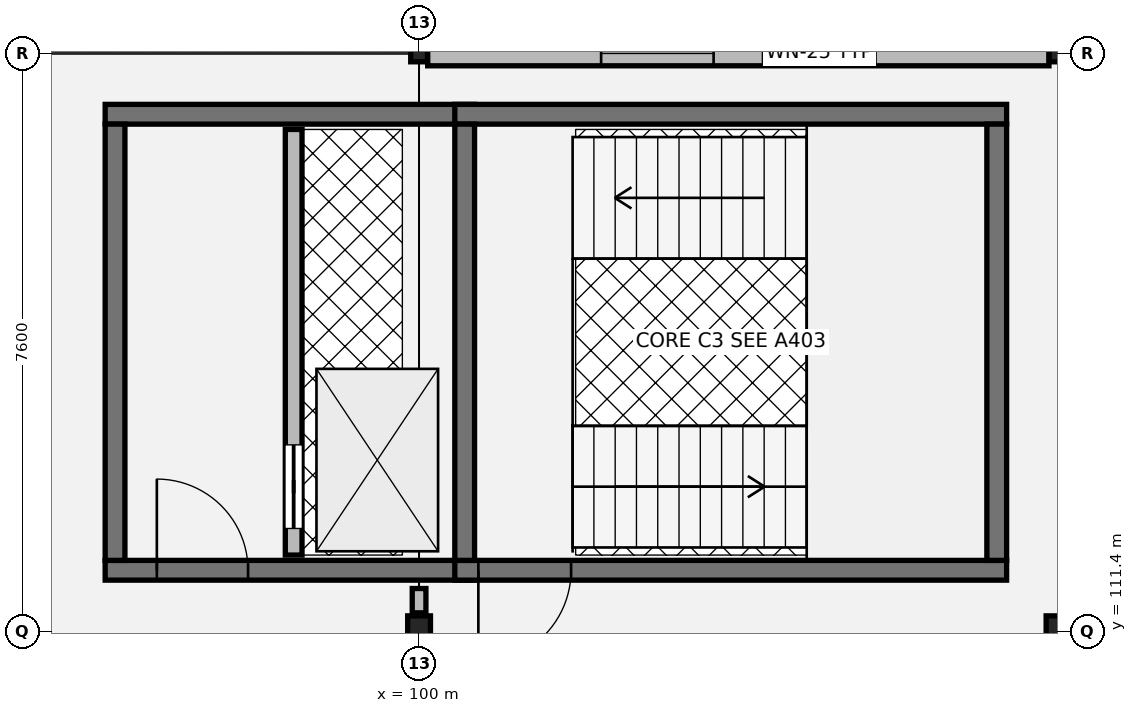
"""IFC4 building model, lengths in metres.
Left out: names, types, materials, properties, quantities, classifications, styles, units other than length and angle.
Written with IfcOpenShell. Run it as: python <this file> out.ifc"""

import sys

from ifc_helpers import new_model, si_unit, direction, frame, frame_2d, origin, origin_2d, place, context, subcontext, project, spatial, rectangle, hollow_rectangle, i_section, extrude, element, fill, save


model = new_model("IFC4")
c1 = context("Model", 3, precision=1e-05, world=origin(), true_north=direction((0.0, 1.0)))
c2 = subcontext(c1, "Body", "Model", "MODEL_VIEW")
j1 = project(units=[si_unit("LENGTHUNIT", "METRE"), si_unit("PLANEANGLEUNIT", "RADIAN")], contexts=[c1])
p1 = place(None, origin())
s1 = spatial("IfcSite", under=j1, at=p1, CompositionType="ELEMENT")
p2 = place(p1, origin())
s2 = spatial("IfcBuilding", under=s1, at=p2, CompositionType="ELEMENT")
p3 = place(p2, frame((0.0, 0.0, 13.26)))
s3 = spatial("IfcBuildingStorey", under=s2, at=p3, CompositionType="ELEMENT", Elevation=13.26)
p4 = place(p3, frame((100.0, 111.4, 0.0), z_axis=(0.0, 0.0, 1.0), x_axis=(1.0, 0.0, 0.0)))
e1 = element("IfcColumn", 1, at=p4, inside=s3, PredefinedType="COLUMN", context=c2, shape_type="SweptSolid", body=[
    extrude(i_section(OverallWidth=0.3, OverallDepth=0.4, WebThickness=0.013, FlangeThickness=0.024, at=origin_2d()), origin(), (0.0, 0.0, 1.0), 4.055),
])
p5 = place(p3, frame((100.0, 119.0, 0.0), z_axis=(0.0, 0.0, 1.0), x_axis=(1.0, 0.0, 0.0)))
e2 = element("IfcColumn", 2, at=p5, inside=s3, PredefinedType="COLUMN", context=c2, shape_type="SweptSolid", body=[
    extrude(hollow_rectangle(XDim=0.22, YDim=0.22, WallThickness=0.01, at=origin_2d()), origin(), (0.0, 0.0, 1.0), 4.055),
])
p6 = place(p3, frame((108.4, 111.4, 0.0), z_axis=(0.0, 0.0, 1.0), x_axis=(1.0, 0.0, 0.0)))
e3 = element("IfcColumn", 3, at=p6, inside=s3, PredefinedType="COLUMN", context=c2, shape_type="SweptSolid", body=[
    extrude(i_section(OverallWidth=0.3, OverallDepth=0.4, WebThickness=0.013, FlangeThickness=0.024, at=origin_2d()), origin(), (0.0, 0.0, 1.0), 4.055),
])
p7 = place(p3, frame((108.4, 119.0, 0.0), z_axis=(0.0, 0.0, 1.0), x_axis=(1.0, 0.0, 0.0)))
e4 = element("IfcColumn", 4, at=p7, inside=s3, PredefinedType="COLUMN", context=c2, shape_type="SweptSolid", body=[
    extrude(hollow_rectangle(XDim=0.22, YDim=0.22, WallThickness=0.01, at=origin_2d()), origin(), (0.0, 0.0, 1.0), 4.055),
])
p8 = place(p3, frame((108.287, 119.0, 0.0), z_axis=(0.0, 0.0, 1.0), x_axis=(-1.0, 0.0, 0.0)))
e5 = element("IfcWall", 5, at=p8, inside=s3, PredefinedType="SOLIDWALL", context=c2, shape_type="SweptSolid", body=[
    extrude(rectangle(XDim=8.174, YDim=0.325, at=frame_2d((4.087, 0.0))), origin(), (0.0, 0.0, 1.0), 3.48),
])
p9 = place(p8, frame((2.282, 0.0, 0.8)))
e6 = element("IfcOpeningElement", 6, at=p9, cuts=e5, PredefinedType="OPENING", context=c2, shape_type="SweptSolid", body=[
    extrude(rectangle(XDim=1.48, YDim=2.16, at=frame_2d((0.74, 1.08))), frame((0.0, 0.172, 0.0), z_axis=(0.0, -1.0, 0.0), x_axis=(1.0, 0.0, 0.0)), (0.0, 0.0, 1.0), 0.345),
])
p10 = place(p8, frame((4.412, 0.0, 0.8)))
e7 = element("IfcOpeningElement", 7, at=p10, cuts=e5, PredefinedType="OPENING", context=c2, shape_type="SweptSolid", body=[
    extrude(rectangle(XDim=1.48, YDim=2.16, at=frame_2d((0.74, 1.08))), frame((0.0, 0.172, 0.0), z_axis=(0.0, -1.0, 0.0), x_axis=(1.0, 0.0, 0.0)), (0.0, 0.0, 1.0), 0.345),
])
p11 = place(p3, frame((95.87, 112.2, 0.0), z_axis=(0.0, 0.0, 1.0), x_axis=(1.0, 0.0, 0.0)))
e8 = element("IfcWall", 8, at=p11, inside=s3, PredefinedType="SHEAR", context=c2, shape_type="SweptSolid", body=[
    extrude(rectangle(XDim=4.86, YDim=0.26, at=frame_2d((2.43, 0.0))), origin(), (0.0, 0.0, 1.0), 3.845),
])
p12 = place(p11, frame((0.68, 0.0, 0.0)))
e9 = element("IfcOpeningElement", 9, at=p12, cuts=e8, PredefinedType="OPENING", context=c2, shape_type="SweptSolid", body=[
    extrude(rectangle(XDim=1.2, YDim=2.16, at=frame_2d((0.6, 1.08))), frame((0.0, 0.14, 0.0), z_axis=(0.0, -1.0, 0.0), x_axis=(1.0, 0.0, 0.0)), (0.0, 0.0, 1.0), 0.28),
])
p13 = place(p3, frame((100.73, 118.2, 0.0), z_axis=(0.0, 0.0, 1.0), x_axis=(-1.0, 0.0, 0.0)))
e10 = element("IfcWall", 10, at=p13, inside=s3, PredefinedType="SHEAR", context=c2, shape_type="SweptSolid", body=[
    extrude(rectangle(XDim=4.86, YDim=0.26, at=frame_2d((2.43, 0.0))), origin(), (0.0, 0.0, 1.0), 3.845),
])
p14 = place(p3, frame((96.0, 118.07, 0.0), z_axis=(0.0, 0.0, 1.0), x_axis=(0.0, -1.0, 0.0)))
e11 = element("IfcWall", 11, at=p14, inside=s3, PredefinedType="SHEAR", context=c2, shape_type="SweptSolid", body=[
    extrude(rectangle(XDim=5.74, YDim=0.26, at=frame_2d((2.87, 0.0))), origin(), (0.0, 0.0, 1.0), 3.845),
])
p15 = place(p3, frame((98.35, 112.4, 0.0), z_axis=(0.0, 0.0, 1.0), x_axis=(0.0, 1.0, 0.0)))
e12 = element("IfcWall", 12, at=p15, inside=s3, PredefinedType="SOLIDWALL", context=c2, shape_type="SweptSolid", body=[
    extrude(rectangle(XDim=5.6, YDim=0.22, at=frame_2d((2.8, 0.0))), origin(), (0.0, 0.0, 1.0), 3.845),
])
p16 = place(p15, frame((0.35, 0.0, 0.0)))
e13 = element("IfcOpeningElement", 13, at=p16, cuts=e12, PredefinedType="OPENING", context=c2, shape_type="SweptSolid", body=[
    extrude(rectangle(XDim=1.1, YDim=2.15, at=frame_2d((0.55, 1.075))), frame((0.0, 0.12, 0.0), z_axis=(0.0, -1.0, 0.0), x_axis=(1.0, 0.0, 0.0)), (0.0, 0.0, 1.0), 0.24),
])
p17 = place(p3, frame((100.47, 112.2, 0.0), z_axis=(0.0, 0.0, 1.0), x_axis=(1.0, 0.0, 0.0)))
e14 = element("IfcWall", 14, at=p17, inside=s3, PredefinedType="SHEAR", context=c2, shape_type="SweptSolid", body=[
    extrude(rectangle(XDim=7.26, YDim=0.26, at=frame_2d((3.63, 0.0))), origin(), (0.0, 0.0, 1.0), 3.845),
])
p18 = place(p17, frame((0.31, 0.0, 0.0)))
e15 = element("IfcOpeningElement", 15, at=p18, cuts=e14, PredefinedType="OPENING", context=c2, shape_type="SweptSolid", body=[
    extrude(rectangle(XDim=1.22, YDim=2.18, at=frame_2d((0.61, 1.09))), frame((0.0, 0.14, 0.0), z_axis=(0.0, -1.0, 0.0), x_axis=(1.0, 0.0, 0.0)), (0.0, 0.0, 1.0), 0.28),
])
p19 = place(p3, frame((100.47, 118.2, 0.0), z_axis=(0.0, 0.0, 1.0), x_axis=(1.0, 0.0, 0.0)))
e16 = element("IfcWall", 16, at=p19, inside=s3, PredefinedType="SHEAR", context=c2, shape_type="SweptSolid", body=[
    extrude(rectangle(XDim=7.26, YDim=0.26, at=frame_2d((3.63, 0.0))), origin(), (0.0, 0.0, 1.0), 3.845),
])
for number, where, z_axis, x_axis in (
    (17, (100.6, 112.33, 0.0), (0.0, 0.0, 1.0), (0.0, 1.0, 0.0)),
    (18, (107.6, 112.33, 0.0), (0.0, 0.0, 1.0), (0.0, 1.0, 0.0)),
):
    element("IfcWall", number, at=place(p3, frame(where, z_axis=z_axis, x_axis=x_axis)), inside=s3, PredefinedType="SHEAR", context=c2, shape_type="SweptSolid", body=[
        extrude(rectangle(XDim=5.74, YDim=0.26, at=frame_2d((2.87, 0.0))), origin(), (0.0, 0.0, 1.0), 3.845),
    ])
p20 = place(p3, frame((100.0, 111.64, 0.0), z_axis=(0.0, 0.0, 1.0), x_axis=(0.0, 1.0, 0.0)))
e19 = element("IfcWall", 19, at=p20, inside=s3, PredefinedType="PARTITIONING", context=c2, shape_type="SweptSolid", body=[
    extrude(rectangle(XDim=0.32, YDim=0.18, at=frame_2d((0.16, 0.0))), origin(), (0.0, 0.0, 1.0), 3.18),
])
p21 = place(p9, origin())
e20 = element("IfcWindow", 20, at=p21, inside=s3, PartitioningType="SINGLE_PANEL", PredefinedType="WINDOW", context=c2, shape_type="SweptSolid", body=[
    extrude(rectangle(XDim=1.48, YDim=2.16, at=frame_2d((0.74, 1.08))), frame((0.0, 0.03, 0.0), z_axis=(0.0, -1.0, 0.0), x_axis=(1.0, 0.0, 0.0)), (0.0, 0.0, 1.0), 0.06),
])
fill(e6, e20)
p22 = place(p10, origin())
e21 = element("IfcWindow", 21, at=p22, inside=s3, PartitioningType="SINGLE_PANEL", PredefinedType="WINDOW", context=c2, shape_type="SweptSolid", body=[
    extrude(rectangle(XDim=1.48, YDim=2.16, at=frame_2d((0.74, 1.08))), frame((0.0, 0.03, 0.0), z_axis=(0.0, -1.0, 0.0), x_axis=(1.0, 0.0, 0.0)), (0.0, 0.0, 1.0), 0.06),
])
fill(e7, e21)
p23 = place(p12, origin())
e22 = element("IfcDoor", 22, at=p23, inside=s3, OperationType="SINGLE_SWING_LEFT", PredefinedType="DOOR", context=c2, shape_type="SweptSolid", body=[
    extrude(rectangle(XDim=1.2, YDim=2.16, at=frame_2d((0.6, 1.08))), frame((0.0, 0.025, 0.0), z_axis=(0.0, -1.0, 0.0), x_axis=(1.0, 0.0, 0.0)), (0.0, 0.0, 1.0), 0.05),
])
fill(e9, e22)
p24 = place(p16, origin())
e23 = element("IfcDoor", 23, at=p24, inside=s3, OperationType="SLIDING_TO_LEFT", PredefinedType="DOOR", context=c2, shape_type="SweptSolid", body=[
    extrude(rectangle(XDim=1.1, YDim=2.15, at=frame_2d((0.55, 1.075))), frame((0.0, 0.025, 0.0), z_axis=(0.0, -1.0, 0.0), x_axis=(1.0, 0.0, 0.0)), (0.0, 0.0, 1.0), 0.05),
])
fill(e13, e23)
p25 = place(p18, origin())
e24 = element("IfcDoor", 24, at=p25, inside=s3, OperationType="SINGLE_SWING_RIGHT", PredefinedType="DOOR", context=c2, shape_type="SweptSolid", body=[
    extrude(rectangle(XDim=1.22, YDim=2.18, at=frame_2d((0.61, 1.09))), frame((0.0, 0.025, 0.0), z_axis=(0.0, -1.0, 0.0), x_axis=(1.0, 0.0, 0.0)), (0.0, 0.0, 1.0), 0.05),
])
fill(e15, e24)
save(model, sys.argv[1])
